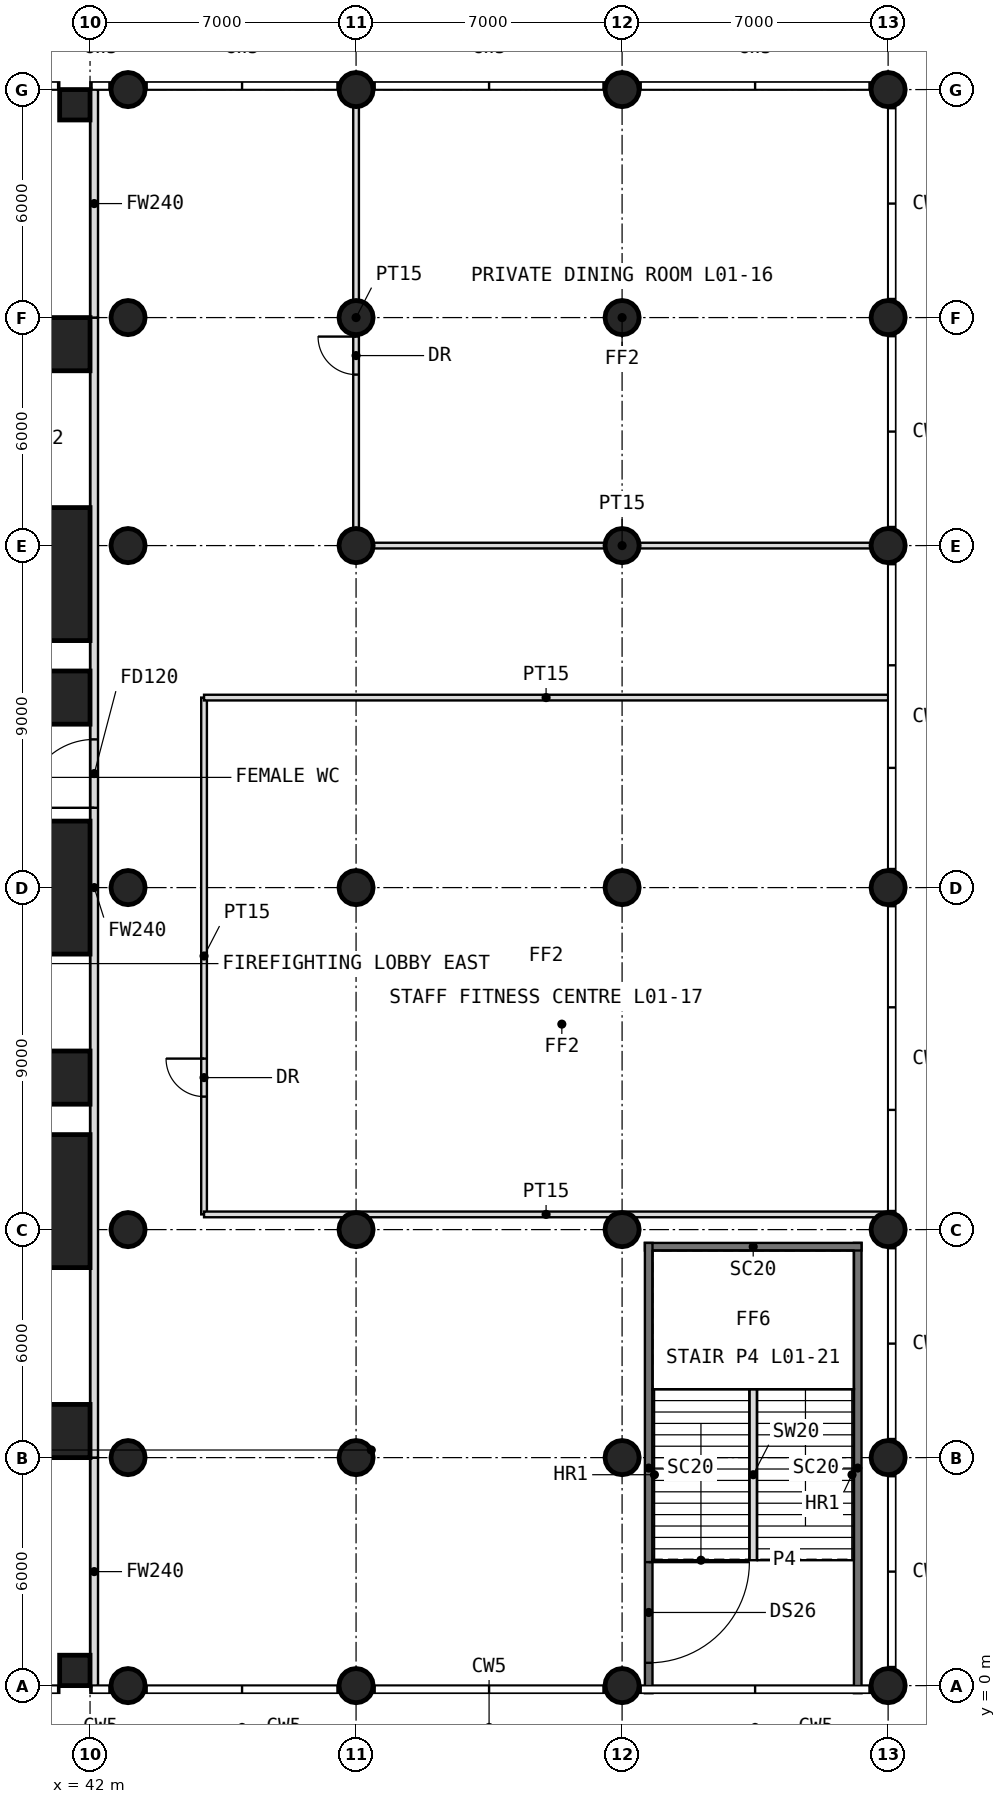
"""IFC4 building model, lengths in metres.
Left out: names, types, materials, properties, quantities, classifications, styles, units other than length and angle.
Written with IfcOpenShell. Run it as: python <this file> out.ifc"""

import sys

from ifc_helpers import new_model, si_unit, direction, frame, frame_2d, origin, origin_2d, place, context, subcontext, project, spatial, rectangle, circle, extrude, element, fill, save


model = new_model("IFC4")
c1 = context("Model", 3, precision=1e-05, world=origin(), true_north=direction((0.0, 1.0)))
c2 = subcontext(c1, "Body", "Model", "MODEL_VIEW")
j1 = project(units=[si_unit("LENGTHUNIT", "METRE"), si_unit("PLANEANGLEUNIT", "RADIAN")], contexts=[c1])
p1 = place(None, origin())
s1 = spatial("IfcSite", under=j1, at=p1, CompositionType="ELEMENT")
p2 = place(p1, origin())
s2 = spatial("IfcBuilding", under=s1, at=p2, CompositionType="ELEMENT")
p3 = place(p2, frame((0.0, 0.0, 6.0)))
s3 = spatial("IfcBuildingStorey", under=s2, at=p3, CompositionType="ELEMENT", Elevation=6.0)
p4 = place(p3, frame((41.6, 0.4, 0.0), z_axis=(0.0, 0.0, 1.0), x_axis=(1.0, 0.0, 0.0)))
e1 = element("IfcColumn", 1, at=p4, inside=s3, PredefinedType="COLUMN", context=c2, shape_type="SweptSolid", body=[
    extrude(rectangle(XDim=0.8, YDim=0.8, at=origin_2d()), origin(), (0.0, 0.0, 1.0), 5.0),
])
for number, where, z_axis, x_axis in (
    (2, (43.0, 0.0, 0.0), (0.0, 0.0, 1.0), (1.0, 0.0, 0.0)),
    (3, (49.0, 0.0, 0.0), (0.0, 0.0, 1.0), (1.0, 0.0, 0.0)),
    (4, (56.0, 0.0, 0.0), (0.0, 0.0, 1.0), (1.0, 0.0, 0.0)),
    (5, (63.0, 0.0, 0.0), (0.0, 0.0, 1.0), (1.0, 0.0, 0.0)),
):
    element("IfcColumn", number, at=place(p3, frame(where, z_axis=z_axis, x_axis=x_axis)), inside=s3, PredefinedType="COLUMN", context=c2, shape_type="SweptSolid", body=[
        extrude(circle(Radius=0.45, at=origin_2d()), origin(), (0.0, 0.0, 1.0), 5.0),
    ])
p5 = place(p3, frame((41.3, 6.7, 0.0), z_axis=(0.0, 0.0, 1.0), x_axis=(1.0, 0.0, 0.0)))
e6 = element("IfcColumn", 6, at=p5, inside=s3, PredefinedType="COLUMN", context=c2, shape_type="SweptSolid", body=[
    extrude(rectangle(XDim=1.4, YDim=1.4, at=origin_2d()), origin(), (0.0, 0.0, 1.0), 5.0),
])
for number, where, z_axis, x_axis in (
    (7, (43.0, 6.0, 0.0), (0.0, 0.0, 1.0), (1.0, 0.0, 0.0)),
    (8, (49.0, 6.0, 0.0), (0.0, 0.0, 1.0), (1.0, 0.0, 0.0)),
    (9, (56.0, 6.0, 0.0), (0.0, 0.0, 1.0), (1.0, 0.0, 0.0)),
    (10, (63.0, 6.0, 0.0), (0.0, 0.0, 1.0), (1.0, 0.0, 0.0)),
):
    element("IfcColumn", number, at=place(p3, frame(where, z_axis=z_axis, x_axis=x_axis)), inside=s3, PredefinedType="COLUMN", context=c2, shape_type="SweptSolid", body=[
        extrude(circle(Radius=0.45, at=origin_2d()), origin(), (0.0, 0.0, 1.0), 5.0),
    ])
p6 = place(p3, frame((40.25, 12.75, 0.0), z_axis=(0.0, 0.0, 1.0), x_axis=(1.0, 0.0, 0.0)))
e11 = element("IfcColumn", 11, at=p6, inside=s3, PredefinedType="COLUMN", context=c2, shape_type="SweptSolid", body=[
    extrude(rectangle(XDim=3.5, YDim=3.5, at=origin_2d()), origin(), (0.0, 0.0, 1.0), 5.0),
])
for number, where, z_axis, x_axis in (
    (12, (43.0, 12.0, 0.0), (0.0, 0.0, 1.0), (1.0, 0.0, 0.0)),
    (13, (49.0, 12.0, 0.0), (0.0, 0.0, 1.0), (1.0, 0.0, 0.0)),
    (14, (56.0, 12.0, 0.0), (0.0, 0.0, 1.0), (1.0, 0.0, 0.0)),
    (15, (63.0, 12.0, 0.0), (0.0, 0.0, 1.0), (1.0, 0.0, 0.0)),
):
    element("IfcColumn", number, at=place(p3, frame(where, z_axis=z_axis, x_axis=x_axis)), inside=s3, PredefinedType="COLUMN", context=c2, shape_type="SweptSolid", body=[
        extrude(circle(Radius=0.45, at=origin_2d()), origin(), (0.0, 0.0, 1.0), 5.0),
    ])
p7 = place(p3, frame((41.3, 16.0, 0.0), z_axis=(0.0, 0.0, 1.0), x_axis=(1.0, 0.0, 0.0)))
e16 = element("IfcColumn", 16, at=p7, inside=s3, PredefinedType="COLUMN", context=c2, shape_type="SweptSolid", body=[
    extrude(rectangle(XDim=1.4, YDim=1.4, at=origin_2d()), origin(), (0.0, 0.0, 1.0), 5.0),
])
p8 = place(p3, frame((40.25, 21.0, 0.0), z_axis=(0.0, 0.0, 1.0), x_axis=(1.0, 0.0, 0.0)))
e17 = element("IfcColumn", 17, at=p8, inside=s3, PredefinedType="COLUMN", context=c2, shape_type="SweptSolid", body=[
    extrude(rectangle(XDim=3.5, YDim=3.5, at=origin_2d()), origin(), (0.0, 0.0, 1.0), 5.0),
])
for number, where, z_axis, x_axis in (
    (18, (43.0, 21.0, 0.0), (0.0, 0.0, 1.0), (1.0, 0.0, 0.0)),
    (19, (49.0, 21.0, 0.0), (0.0, 0.0, 1.0), (1.0, 0.0, 0.0)),
    (20, (56.0, 21.0, 0.0), (0.0, 0.0, 1.0), (1.0, 0.0, 0.0)),
    (21, (63.0, 21.0, 0.0), (0.0, 0.0, 1.0), (1.0, 0.0, 0.0)),
):
    element("IfcColumn", number, at=place(p3, frame(where, z_axis=z_axis, x_axis=x_axis)), inside=s3, PredefinedType="COLUMN", context=c2, shape_type="SweptSolid", body=[
        extrude(circle(Radius=0.45, at=origin_2d()), origin(), (0.0, 0.0, 1.0), 5.0),
    ])
p9 = place(p3, frame((41.3, 26.0, 0.0), z_axis=(0.0, 0.0, 1.0), x_axis=(1.0, 0.0, 0.0)))
e22 = element("IfcColumn", 22, at=p9, inside=s3, PredefinedType="COLUMN", context=c2, shape_type="SweptSolid", body=[
    extrude(rectangle(XDim=1.4, YDim=1.4, at=origin_2d()), origin(), (0.0, 0.0, 1.0), 5.0),
])
for number, where, z_axis, x_axis in (
    (23, (43.0, 30.0, 0.0), (0.0, 0.0, 1.0), (1.0, 0.0, 0.0)),
    (24, (49.0, 30.0, 0.0), (0.0, 0.0, 1.0), (1.0, 0.0, 0.0)),
    (25, (56.0, 30.0, 0.0), (0.0, 0.0, 1.0), (1.0, 0.0, 0.0)),
    (26, (63.0, 30.0, 0.0), (0.0, 0.0, 1.0), (1.0, 0.0, 0.0)),
):
    element("IfcColumn", number, at=place(p3, frame(where, z_axis=z_axis, x_axis=x_axis)), inside=s3, PredefinedType="COLUMN", context=c2, shape_type="SweptSolid", body=[
        extrude(circle(Radius=0.45, at=origin_2d()), origin(), (0.0, 0.0, 1.0), 5.0),
    ])
p10 = place(p3, frame((40.25, 29.25, 0.0), z_axis=(0.0, 0.0, 1.0), x_axis=(1.0, 0.0, 0.0)))
e27 = element("IfcColumn", 27, at=p10, inside=s3, PredefinedType="COLUMN", context=c2, shape_type="SweptSolid", body=[
    extrude(rectangle(XDim=3.5, YDim=3.5, at=origin_2d()), origin(), (0.0, 0.0, 1.0), 5.0),
])
p11 = place(p3, frame((41.3, 35.3, 0.0), z_axis=(0.0, 0.0, 1.0), x_axis=(1.0, 0.0, 0.0)))
e28 = element("IfcColumn", 28, at=p11, inside=s3, PredefinedType="COLUMN", context=c2, shape_type="SweptSolid", body=[
    extrude(rectangle(XDim=1.4, YDim=1.4, at=origin_2d()), origin(), (0.0, 0.0, 1.0), 5.0),
])
for number, where, z_axis, x_axis in (
    (29, (43.0, 36.0, 0.0), (0.0, 0.0, 1.0), (1.0, 0.0, 0.0)),
    (30, (49.0, 36.0, 0.0), (0.0, 0.0, 1.0), (1.0, 0.0, 0.0)),
    (31, (56.0, 36.0, 0.0), (0.0, 0.0, 1.0), (1.0, 0.0, 0.0)),
    (32, (63.0, 36.0, 0.0), (0.0, 0.0, 1.0), (1.0, 0.0, 0.0)),
):
    element("IfcColumn", number, at=place(p3, frame(where, z_axis=z_axis, x_axis=x_axis)), inside=s3, PredefinedType="COLUMN", context=c2, shape_type="SweptSolid", body=[
        extrude(circle(Radius=0.45, at=origin_2d()), origin(), (0.0, 0.0, 1.0), 5.0),
    ])
p12 = place(p3, frame((41.6, 41.6, 0.0), z_axis=(0.0, 0.0, 1.0), x_axis=(1.0, 0.0, 0.0)))
e33 = element("IfcColumn", 33, at=p12, inside=s3, PredefinedType="COLUMN", context=c2, shape_type="SweptSolid", body=[
    extrude(rectangle(XDim=0.8, YDim=0.8, at=origin_2d()), origin(), (0.0, 0.0, 1.0), 5.0),
])
for number, where, z_axis, x_axis in (
    (34, (43.0, 42.0, 0.0), (0.0, 0.0, 1.0), (1.0, 0.0, 0.0)),
    (35, (49.0, 42.0, 0.0), (0.0, 0.0, 1.0), (1.0, 0.0, 0.0)),
    (36, (56.0, 42.0, 0.0), (0.0, 0.0, 1.0), (1.0, 0.0, 0.0)),
    (37, (63.0, 42.0, 0.0), (0.0, 0.0, 1.0), (1.0, 0.0, 0.0)),
):
    element("IfcColumn", number, at=place(p3, frame(where, z_axis=z_axis, x_axis=x_axis)), inside=s3, PredefinedType="COLUMN", context=c2, shape_type="SweptSolid", body=[
        extrude(circle(Radius=0.45, at=origin_2d()), origin(), (0.0, 0.0, 1.0), 5.0),
    ])
p13 = place(p3, frame((62.2, -0.2, -0.2), z_axis=(0.0, 0.0, 1.0), x_axis=(0.0, 1.0, 0.0)))
e38 = element("IfcWall", 38, at=p13, inside=s3, PredefinedType="SOLIDWALL", context=c2, shape_type="SweptSolid", body=[
    extrude(rectangle(XDim=11.85, YDim=0.2, at=frame_2d((5.925, 0.0))), origin(), (0.0, 0.0, 1.0), 4.9),
])
p14 = place(p3, frame((62.3, 11.55, -0.2), z_axis=(0.0, 0.0, 1.0), x_axis=(-1.0, 0.0, 0.0)))
e39 = element("IfcWall", 39, at=p14, inside=s3, PredefinedType="SOLIDWALL", context=c2, shape_type="SweptSolid", body=[
    extrude(rectangle(XDim=5.7, YDim=0.2, at=frame_2d((2.85, 0.0))), origin(), (0.0, 0.0, 1.0), 4.9),
])
p15 = place(p3, frame((56.7, 11.65, -0.2), z_axis=(0.0, 0.0, 1.0), x_axis=(0.0, -1.0, 0.0)))
e40 = element("IfcWall", 40, at=p15, inside=s3, PredefinedType="SOLIDWALL", context=c2, shape_type="SweptSolid", body=[
    extrude(rectangle(XDim=11.85, YDim=0.2, at=frame_2d((5.925, 0.0))), origin(), (0.0, 0.0, 1.0), 4.9),
])
p16 = place(p15, frame((8.4, 0.0, 0.2)))
e41 = element("IfcOpeningElement", 41, at=p16, cuts=e40, PredefinedType="OPENING", context=c2, shape_type="SweptSolid", body=[
    extrude(rectangle(XDim=2.65, YDim=2.4, at=frame_2d((1.325, 1.2))), frame((0.0, 0.11, 0.0), z_axis=(0.0, -1.0, 0.0), x_axis=(1.0, 0.0, 0.0)), (0.0, 0.0, 1.0), 0.22),
])
p17 = place(p3, frame((42.11, 0.0, 0.0), z_axis=(0.0, 0.0, 1.0), x_axis=(0.0, 1.0, 0.0)))
e42 = element("IfcWall", 42, at=p17, inside=s3, PredefinedType="PARTITIONING", context=c2, shape_type="SweptSolid", body=[
    extrude(rectangle(XDim=6.0, YDim=0.2, at=frame_2d((3.0, 0.0))), origin(), (0.0, 0.0, 1.0), 3.88),
])
p18 = place(p3, frame((42.11, 6.0, 0.0), z_axis=(0.0, 0.0, 1.0), x_axis=(0.0, 1.0, 0.0)))
e43 = element("IfcWall", 43, at=p18, inside=s3, PredefinedType="PARTITIONING", context=c2, shape_type="SweptSolid", body=[
    extrude(rectangle(XDim=30.0, YDim=0.2, at=frame_2d((15.0, 0.0))), origin(), (0.0, 0.0, 1.0), 4.5),
])
p19 = place(p18, frame((17.1, 0.0, 0.0)))
e44 = element("IfcOpeningElement", 44, at=p19, cuts=e43, PredefinedType="OPENING", context=c2, shape_type="SweptSolid", body=[
    extrude(rectangle(XDim=1.8, YDim=2.4, at=frame_2d((0.9, 1.2))), frame((0.0, 0.11, 0.0), z_axis=(0.0, -1.0, 0.0), x_axis=(1.0, 0.0, 0.0)), (0.0, 0.0, 1.0), 0.22),
])
p20 = place(p3, frame((42.11, 36.0, 0.0), z_axis=(0.0, 0.0, 1.0), x_axis=(0.0, 1.0, 0.0)))
e45 = element("IfcWall", 45, at=p20, inside=s3, PredefinedType="PARTITIONING", context=c2, shape_type="SweptSolid", body=[
    extrude(rectangle(XDim=6.0, YDim=0.2, at=frame_2d((3.0, 0.0))), origin(), (0.0, 0.0, 1.0), 3.88),
])
p21 = place(p3, frame((45.0, 12.4, 0.0), z_axis=(0.0, 0.0, 1.0), x_axis=(0.0, 1.0, 0.0)))
e46 = element("IfcWall", 46, at=p21, inside=s3, PredefinedType="PARTITIONING", context=c2, shape_type="SweptSolid", body=[
    extrude(rectangle(XDim=13.6, YDim=0.15, at=frame_2d((6.8, 0.0))), origin(), (0.0, 0.0, 1.0), 4.5),
])
p22 = place(p21, frame((3.1, 0.0, 0.0)))
e47 = element("IfcOpeningElement", 47, at=p22, cuts=e46, PredefinedType="OPENING", context=c2, shape_type="SweptSolid", body=[
    extrude(rectangle(XDim=1.0, YDim=2.2, at=frame_2d((0.5, 1.1))), frame((0.0, 0.085, 0.0), z_axis=(0.0, -1.0, 0.0), x_axis=(1.0, 0.0, 0.0)), (0.0, 0.0, 1.0), 0.17),
])
for number, where, z_axis, x_axis in (
    (48, (45.0, 12.4, 0.0), (0.0, 0.0, 1.0), (1.0, 0.0, 0.0)),
    (49, (45.0, 26.0, 0.0), (0.0, 0.0, 1.0), (1.0, 0.0, 0.0)),
):
    element("IfcWall", number, at=place(p3, frame(where, z_axis=z_axis, x_axis=x_axis)), inside=s3, PredefinedType="PARTITIONING", context=c2, shape_type="SweptSolid", body=[
        extrude(rectangle(XDim=18.0, YDim=0.15, at=frame_2d((9.0, 0.0))), origin(), (0.0, 0.0, 1.0), 4.5),
    ])
p23 = place(p3, frame((49.0, 30.0, 0.0), z_axis=(0.0, 0.0, 1.0), x_axis=(0.0, 1.0, 0.0)))
e50 = element("IfcWall", 50, at=p23, inside=s3, PredefinedType="PARTITIONING", context=c2, shape_type="SweptSolid", body=[
    extrude(rectangle(XDim=12.0, YDim=0.15, at=frame_2d((6.0, 0.0))), origin(), (0.0, 0.0, 1.0), 3.5),
])
p24 = place(p23, frame((4.5, 0.0, 0.0)))
e51 = element("IfcOpeningElement", 51, at=p24, cuts=e50, PredefinedType="OPENING", context=c2, shape_type="SweptSolid", body=[
    extrude(rectangle(XDim=1.0, YDim=2.2, at=frame_2d((0.5, 1.1))), frame((0.0, 0.085, 0.0), z_axis=(0.0, -1.0, 0.0), x_axis=(1.0, 0.0, 0.0)), (0.0, 0.0, 1.0), 0.17),
])
p25 = place(p3, frame((49.0, 30.0, 0.0), z_axis=(0.0, 0.0, 1.0), x_axis=(1.0, 0.0, 0.0)))
e52 = element("IfcWall", 52, at=p25, inside=s3, PredefinedType="PARTITIONING", context=c2, shape_type="SweptSolid", body=[
    extrude(rectangle(XDim=14.0, YDim=0.15, at=frame_2d((7.0, 0.0))), origin(), (0.0, 0.0, 1.0), 3.5),
])
p26 = place(p3, frame((59.45, 3.3, 0.0), z_axis=(0.0, 0.0, 1.0), x_axis=(0.0, 1.0, 0.0)))
e53 = element("IfcWall", 53, at=p26, inside=s3, PredefinedType="PARTITIONING", context=c2, shape_type="SweptSolid", body=[
    extrude(rectangle(XDim=4.5, YDim=0.2, at=frame_2d((2.25, 0.0))), origin(), (0.0, 0.0, 1.0), 5.0),
])
p27 = place(p16, origin())
e54 = element("IfcDoor", 54, at=p27, inside=s3, OperationType="DOUBLE_DOOR_SINGLE_SWING", PredefinedType="DOOR", context=c2, shape_type="SweptSolid", body=[
    extrude(rectangle(XDim=2.65, YDim=2.4, at=frame_2d((1.325, 1.2))), frame((0.0, 0.025, 0.0), z_axis=(0.0, -1.0, 0.0), x_axis=(1.0, 0.0, 0.0)), (0.0, 0.0, 1.0), 0.05),
])
fill(e41, e54)
p28 = place(p19, origin())
e55 = element("IfcDoor", 55, at=p28, inside=s3, OperationType="DOUBLE_DOOR_SINGLE_SWING", PredefinedType="DOOR", context=c2, shape_type="SweptSolid", body=[
    extrude(rectangle(XDim=1.8, YDim=2.4, at=frame_2d((0.9, 1.2))), frame((0.0, 0.025, 0.0), z_axis=(0.0, -1.0, 0.0), x_axis=(1.0, 0.0, 0.0)), (0.0, 0.0, 1.0), 0.05),
])
fill(e44, e55)
p29 = place(p24, origin())
e56 = element("IfcDoor", 56, at=p29, inside=s3, OperationType="SINGLE_SWING_RIGHT", PredefinedType="DOOR", context=c2, shape_type="SweptSolid", body=[
    extrude(rectangle(XDim=1.0, YDim=2.2, at=frame_2d((0.5, 1.1))), frame((0.0, 0.025, 0.0), z_axis=(0.0, -1.0, 0.0), x_axis=(1.0, 0.0, 0.0)), (0.0, 0.0, 1.0), 0.05),
])
fill(e51, e56)
p30 = place(p22, origin())
e57 = element("IfcDoor", 57, at=p30, inside=s3, OperationType="SINGLE_SWING_RIGHT", PredefinedType="DOOR", context=c2, shape_type="SweptSolid", body=[
    extrude(rectangle(XDim=1.0, YDim=2.2, at=frame_2d((0.5, 1.1))), frame((0.0, 0.025, 0.0), z_axis=(0.0, -1.0, 0.0), x_axis=(1.0, 0.0, 0.0)), (0.0, 0.0, 1.0), 0.05),
])
fill(e47, e57)
save(model, sys.argv[1])
